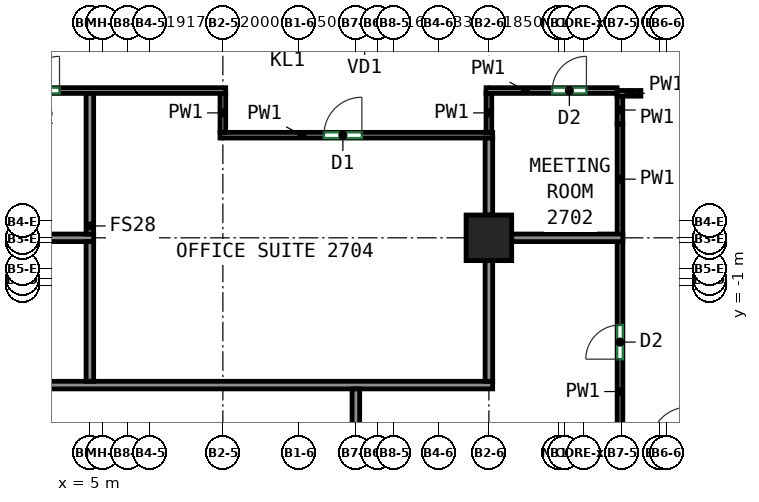
"""IFC4 building model, lengths in metres.
Left out: names, types, materials, properties, quantities, classifications, styles, units other than length and angle.
Written with IfcOpenShell. Run it as: python <this file> out.ifc"""

import sys

from ifc_helpers import new_model, si_unit, direction, frame, frame_2d, origin, origin_2d, place, context, subcontext, project, spatial, rectangle, extrude, source, transform, mapped, element, fill, save


model = new_model("IFC4")
c1 = context("Model", 3, precision=1e-05, world=origin(), true_north=direction((0.0, 1.0)))
c2 = subcontext(c1, "Body", "Model", "MODEL_VIEW")
j1 = project(units=[si_unit("LENGTHUNIT", "METRE"), si_unit("PLANEANGLEUNIT", "RADIAN")], contexts=[c1])
p1 = place(None, origin())
s1 = spatial("IfcSite", under=j1, at=p1, CompositionType="ELEMENT")
p2 = place(p1, origin())
s2 = spatial("IfcBuilding", under=s1, at=p2, CompositionType="ELEMENT")
p3 = place(p2, frame((0.0, 0.0, 116.6)))
s3 = spatial("IfcBuildingStorey", under=s2, at=p3, CompositionType="ELEMENT", Elevation=116.6)
m1 = source(origin(), c2, "Body", "SweptSolid", [
    extrude(rectangle(XDim=1.2, YDim=1.2, at=origin_2d()), origin(), (0.0, 0.0, 1.0), 3.72),
])
p4 = place(p3, frame((15.5, 0.25, 0.0), z_axis=(0.0, 0.0, 1.0), x_axis=(1.0, 0.0, 0.0)))
e1 = element("IfcColumn", 1, at=p4, inside=s3, PredefinedType="COLUMN", context=c2, shape_type="MappedRepresentation", body=[
    mapped(m1, transform((0.0, 0.0, 0.0))),
])
p5 = place(p3, frame((-2.075, 4.125, 0.0), z_axis=(0.0, 0.0, 1.0), x_axis=(1.0, 0.0, 0.0)))
e2 = element("IfcWall", 2, at=p5, inside=s3, PredefinedType="PARTITIONING", context=c2, shape_type="SweptSolid", body=[
    extrude(rectangle(XDim=10.65, YDim=0.15, at=frame_2d((5.325, 0.0))), origin(), (0.0, 0.0, 1.0), 3.72),
])
p6 = place(p5, frame((5.376, 0.0, 0.0)))
e3 = element("IfcOpeningElement", 3, at=p6, cuts=e2, PredefinedType="OPENING", context=c2, shape_type="SweptSolid", body=[
    extrude(rectangle(XDim=0.9, YDim=2.1, at=frame_2d((0.45, 1.05))), frame((0.0, 0.085, 0.0), z_axis=(0.0, -1.0, 0.0), x_axis=(1.0, 0.0, 0.0)), (0.0, 0.0, 1.0), 0.17),
])
p7 = place(p3, frame((8.425, 2.95, 0.0), z_axis=(0.0, 0.0, 1.0), x_axis=(1.0, 0.0, 0.0)))
e4 = element("IfcWall", 4, at=p7, inside=s3, PredefinedType="PARTITIONING", context=c2, shape_type="SweptSolid", body=[
    extrude(rectangle(XDim=7.175, YDim=0.15, at=frame_2d((3.587, 0.0))), origin(), (0.0, 0.0, 1.0), 3.72),
])
p8 = place(p7, frame((2.733, 0.0, 0.0)))
e5 = element("IfcOpeningElement", 5, at=p8, cuts=e4, PredefinedType="OPENING", context=c2, shape_type="SweptSolid", body=[
    extrude(rectangle(XDim=1.0, YDim=2.1, at=frame_2d((0.5, 1.05))), frame((0.0, 0.085, 0.0), z_axis=(0.0, -1.0, 0.0), x_axis=(1.0, 0.0, 0.0)), (0.0, 0.0, 1.0), 0.17),
])
p9 = place(p3, frame((8.5, 4.05, 0.0), z_axis=(0.0, 0.0, 1.0), x_axis=(0.0, -1.0, 0.0)))
e6 = element("IfcWall", 6, at=p9, inside=s3, PredefinedType="PARTITIONING", context=c2, shape_type="SweptSolid", body=[
    extrude(rectangle(XDim=1.025, YDim=0.15, at=frame_2d((0.513, 0.0))), origin(), (0.0, 0.0, 1.0), 3.72),
])
p10 = place(p3, frame((18.95, -7.75, 0.0), z_axis=(0.0, 0.0, 1.0), x_axis=(0.0, 1.0, 0.0)))
e7 = element("IfcWall", 7, at=p10, inside=s3, PredefinedType="PARTITIONING", context=c2, shape_type="SweptSolid", body=[
    extrude(rectangle(XDim=7.91, YDim=0.15, at=frame_2d((3.955, 0.0))), origin(), (0.0, 0.0, 1.0), 3.72),
])
p11 = place(p10, frame((4.807, 0.0, 0.0)))
e8 = element("IfcOpeningElement", 8, at=p11, cuts=e7, PredefinedType="OPENING", context=c2, shape_type="SweptSolid", body=[
    extrude(rectangle(XDim=0.9, YDim=2.1, at=frame_2d((0.45, 1.05))), frame((0.0, 0.085, 0.0), z_axis=(0.0, -1.0, 0.0), x_axis=(1.0, 0.0, 0.0)), (0.0, 0.0, 1.0), 0.17),
])
p12 = place(p3, frame((18.95, 0.34, 0.0), z_axis=(0.0, 0.0, 1.0), x_axis=(0.0, 1.0, 0.0)))
e9 = element("IfcWall", 9, at=p12, inside=s3, PredefinedType="PARTITIONING", context=c2, shape_type="SweptSolid", body=[
    extrude(rectangle(XDim=2.908, YDim=0.15, at=frame_2d((1.454, 0.0))), origin(), (0.0, 0.0, 1.0), 3.72),
])
p13 = place(p3, frame((18.948, 3.977, 0.0), z_axis=(0.0, 0.0, 1.0), x_axis=(0.0, -1.0, 0.0)))
e10 = element("IfcWall", 10, at=p13, inside=s3, PredefinedType="PARTITIONING", context=c2, shape_type="SweptSolid", body=[
    extrude(rectangle(XDim=0.729, YDim=0.15, at=frame_2d((0.365, 0.0))), origin(), (0.0, 0.0, 1.0), 3.72),
])
p14 = place(p3, frame((18.873, 4.052, 0.0), z_axis=(0.0, 0.0, 1.0), x_axis=(1.0, 0.0, 0.0)))
e11 = element("IfcWall", 11, at=p14, inside=s3, PredefinedType="PARTITIONING", context=c2, shape_type="SweptSolid", body=[
    extrude(rectangle(XDim=0.627, YDim=0.15, at=frame_2d((0.313, 0.0))), origin(), (0.0, 0.0, 1.0), 3.72),
])
p15 = place(p3, frame((15.425, 4.125, 0.0), z_axis=(0.0, 0.0, 1.0), x_axis=(1.0, 0.0, 0.0)))
e12 = element("IfcWall", 12, at=p15, inside=s3, PredefinedType="PARTITIONING", context=c2, shape_type="SweptSolid", body=[
    extrude(rectangle(XDim=3.448, YDim=0.15, at=frame_2d((1.724, 0.0))), origin(), (0.0, 0.0, 1.0), 3.72),
])
p16 = place(p15, frame((1.742, 0.0, 0.0)))
e13 = element("IfcOpeningElement", 13, at=p16, cuts=e12, PredefinedType="OPENING", context=c2, shape_type="SweptSolid", body=[
    extrude(rectangle(XDim=0.9, YDim=2.1, at=frame_2d((0.45, 1.05))), frame((0.0, 0.085, 0.0), z_axis=(0.0, -1.0, 0.0), x_axis=(1.0, 0.0, 0.0)), (0.0, 0.0, 1.0), 0.17),
])
p17 = place(p3, frame((15.5, 3.025, 0.0), z_axis=(0.0, 0.0, 1.0), x_axis=(0.0, 1.0, 0.0)))
e14 = element("IfcWall", 14, at=p17, inside=s3, PredefinedType="PARTITIONING", context=c2, shape_type="SweptSolid", body=[
    extrude(rectangle(XDim=1.025, YDim=0.15, at=frame_2d((0.513, 0.0))), origin(), (0.0, 0.0, 1.0), 3.72),
])
p18 = place(p3, frame((-17.874, -3.625, 0.0), z_axis=(0.0, 0.0, 1.0), x_axis=(1.0, 0.0, 0.0)))
e15 = element("IfcWall", 15, at=p18, inside=s3, PredefinedType="PARTITIONING", context=c2, shape_type="SweptSolid", body=[
    extrude(rectangle(XDim=33.474, YDim=0.2, at=frame_2d((16.737, 0.0))), origin(), (0.0, 0.0, 1.0), 3.72),
])
p19 = place(p3, frame((12.0, -11.275, 0.0), z_axis=(0.0, 0.0, 1.0), x_axis=(0.0, 1.0, 0.0)))
e16 = element("IfcWall", 16, at=p19, inside=s3, PredefinedType="PARTITIONING", context=c2, shape_type="SweptSolid", body=[
    extrude(rectangle(XDim=7.55, YDim=0.2, at=frame_2d((3.775, 0.0))), origin(), (0.0, 0.0, 1.0), 3.72),
])
p20 = place(p3, frame((-2.1, 0.25, 0.0), z_axis=(0.0, 0.0, 1.0), x_axis=(1.0, 0.0, 0.0)))
e17 = element("IfcWall", 17, at=p20, inside=s3, PredefinedType="PARTITIONING", context=c2, shape_type="SweptSolid", body=[
    extrude(rectangle(XDim=7.2, YDim=0.2, at=frame_2d((3.6, 0.0))), origin(), (0.0, 0.0, 1.0), 3.07),
])
p21 = place(p3, frame((5.0, -3.525, 0.0), z_axis=(0.0, 0.0, 1.0), x_axis=(0.0, 1.0, 0.0)))
e18 = element("IfcWall", 18, at=p21, inside=s3, PredefinedType="PARTITIONING", context=c2, shape_type="SweptSolid", body=[
    extrude(rectangle(XDim=3.675, YDim=0.2, at=frame_2d((1.837, 0.0))), origin(), (0.0, 0.0, 1.0), 3.72),
])
p22 = place(p3, frame((5.0, 0.35, 0.0), z_axis=(0.0, 0.0, 1.0), x_axis=(0.0, 1.0, 0.0)))
e19 = element("IfcWall", 19, at=p22, inside=s3, PredefinedType="PARTITIONING", context=c2, shape_type="SweptSolid", body=[
    extrude(rectangle(XDim=3.699, YDim=0.2, at=frame_2d((1.85, 0.0))), origin(), (0.0, 0.0, 1.0), 3.72),
])
p23 = place(p3, frame((15.5, -3.525, 0.0), z_axis=(0.0, 0.0, 1.0), x_axis=(0.0, 1.0, 0.0)))
e20 = element("IfcWall", 20, at=p23, inside=s3, PredefinedType="PARTITIONING", context=c2, shape_type="SweptSolid", body=[
    extrude(rectangle(XDim=3.175, YDim=0.2, at=frame_2d((1.587, 0.0))), origin(), (0.0, 0.0, 1.0), 3.72),
])
p24 = place(p3, frame((15.5, 0.85, 0.0), z_axis=(0.0, 0.0, 1.0), x_axis=(0.0, 1.0, 0.0)))
e21 = element("IfcWall", 21, at=p24, inside=s3, PredefinedType="PARTITIONING", context=c2, shape_type="SweptSolid", body=[
    extrude(rectangle(XDim=2.024, YDim=0.2, at=frame_2d((1.012, 0.0))), origin(), (0.0, 0.0, 1.0), 3.72),
])
p25 = place(p3, frame((16.1, 0.25, 0.0), z_axis=(0.0, 0.0, 1.0), x_axis=(1.0, 0.0, 0.0)))
e22 = element("IfcWall", 22, at=p25, inside=s3, PredefinedType="PARTITIONING", context=c2, shape_type="SweptSolid", body=[
    extrude(rectangle(XDim=2.924, YDim=0.2, at=frame_2d((1.462, 0.0))), origin(), (0.0, 0.0, 1.0), 3.72),
])
p26 = place(p11, origin())
e23 = element("IfcDoor", 23, at=p26, inside=s3, OperationType="SINGLE_SWING_LEFT", PredefinedType="DOOR", context=c2, shape_type="SweptSolid", body=[
    extrude(rectangle(XDim=0.9, YDim=2.1, at=frame_2d((0.45, 1.05))), frame((0.0, 0.025, 0.0), z_axis=(0.0, -1.0, 0.0), x_axis=(1.0, 0.0, 0.0)), (0.0, 0.0, 1.0), 0.05),
])
fill(e8, e23)
p27 = place(p8, origin())
e24 = element("IfcDoor", 24, at=p27, inside=s3, OperationType="SINGLE_SWING_RIGHT", PredefinedType="DOOR", context=c2, shape_type="SweptSolid", body=[
    extrude(rectangle(XDim=1.0, YDim=2.1, at=frame_2d((0.5, 1.05))), frame((0.0, 0.025, 0.0), z_axis=(0.0, -1.0, 0.0), x_axis=(1.0, 0.0, 0.0)), (0.0, 0.0, 1.0), 0.05),
])
fill(e5, e24)
p28 = place(p6, origin())
e25 = element("IfcDoor", 25, at=p28, inside=s3, OperationType="SINGLE_SWING_RIGHT", PredefinedType="DOOR", context=c2, shape_type="SweptSolid", body=[
    extrude(rectangle(XDim=0.9, YDim=2.1, at=frame_2d((0.45, 1.05))), frame((0.0, 0.025, 0.0), z_axis=(0.0, -1.0, 0.0), x_axis=(1.0, 0.0, 0.0)), (0.0, 0.0, 1.0), 0.05),
])
fill(e3, e25)
p29 = place(p16, origin())
e26 = element("IfcDoor", 26, at=p29, inside=s3, OperationType="SINGLE_SWING_RIGHT", PredefinedType="DOOR", context=c2, shape_type="SweptSolid", body=[
    extrude(rectangle(XDim=0.9, YDim=2.1, at=frame_2d((0.45, 1.05))), frame((0.0, 0.025, 0.0), z_axis=(0.0, -1.0, 0.0), x_axis=(1.0, 0.0, 0.0)), (0.0, 0.0, 1.0), 0.05),
])
fill(e13, e26)
save(model, sys.argv[1])
